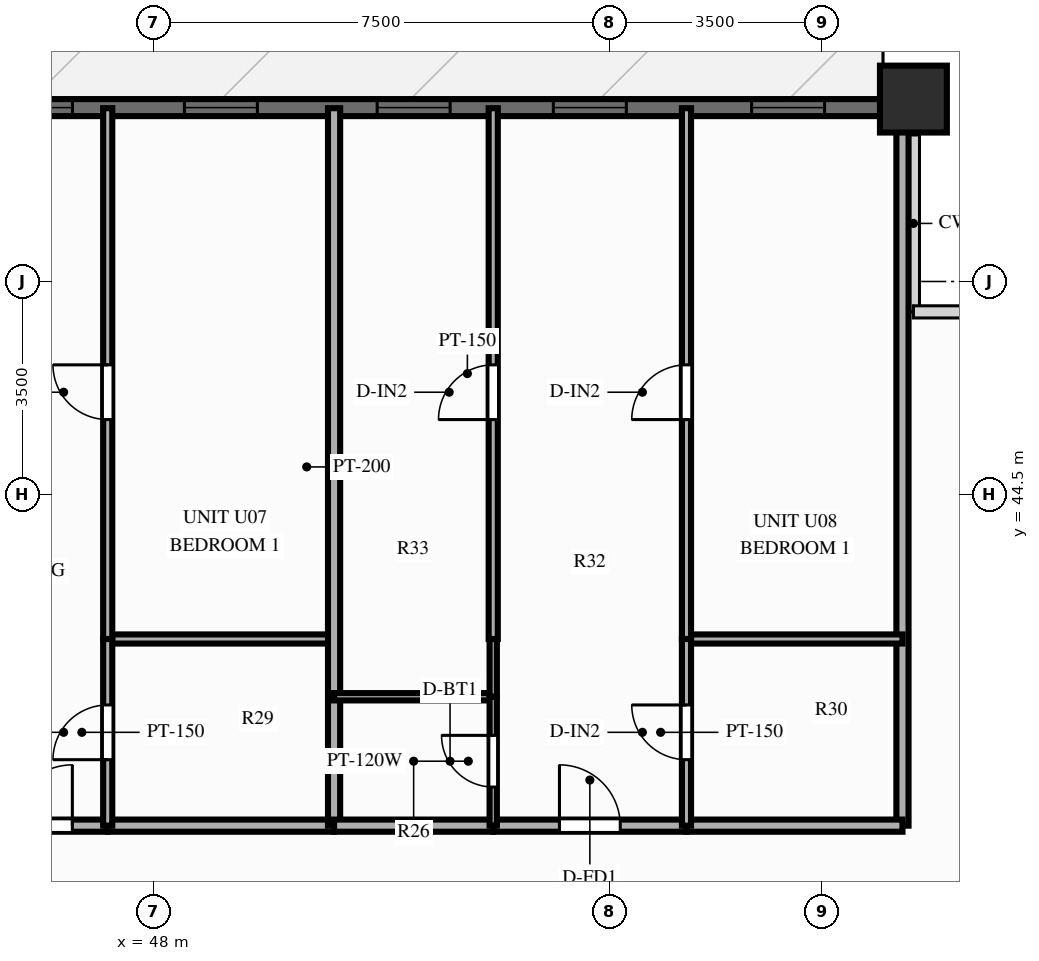
"""IFC4 building model, lengths in metres.
Left out: names, types, materials, properties, quantities, classifications, styles, units other than length and angle.
Written with IfcOpenShell. Run it as: python <this file> out.ifc"""

import sys

from ifc_helpers import new_model, si_unit, direction, frame, frame_2d, origin, origin_2d, place, context, subcontext, project, spatial, rectangle, extrude, source, transform, mapped, element, fill, save


model = new_model("IFC4")
c1 = context("Model", 3, precision=1e-05, world=origin(), true_north=direction((0.0, 1.0)))
c2 = subcontext(c1, "Body", "Model", "MODEL_VIEW")
j1 = project(units=[si_unit("LENGTHUNIT", "METRE"), si_unit("PLANEANGLEUNIT", "RADIAN")], contexts=[c1])
p1 = place(None, origin())
s1 = spatial("IfcSite", under=j1, at=p1, CompositionType="ELEMENT")
p2 = place(p1, origin())
s2 = spatial("IfcBuilding", under=s1, at=p2, CompositionType="ELEMENT")
p3 = place(p2, frame((0.0, 0.0, 43.4)))
s3 = spatial("IfcBuildingStorey", under=s2, at=p3, CompositionType="ELEMENT", Elevation=43.4)
m1 = source(origin(), c2, "Body", "SweptSolid", [
    extrude(rectangle(XDim=1.1, YDim=1.1, at=origin_2d()), origin(), (0.0, 0.0, 1.0), 3.0),
])
p4 = place(p3, frame((60.5, 51.0, 0.0), z_axis=(0.0, 0.0, 1.0), x_axis=(1.0, 0.0, 0.0)))
e1 = element("IfcColumn", 1, at=p4, inside=s3, PredefinedType="COLUMN", context=c2, shape_type="MappedRepresentation", body=[
    mapped(m1, transform((0.0, 0.0, 0.0), scale=1.0)),
])
p5 = place(p3, frame((15.5, 50.86, 0.0), z_axis=(0.0, 0.0, 1.0), x_axis=(1.0, 0.0, 0.0)))
e2 = element("IfcWall", 2, at=p5, inside=s3, PredefinedType="SOLIDWALL", context=c2, shape_type="SweptSolid", body=[
    extrude(rectangle(XDim=45.0, YDim=0.28, at=frame_2d((22.5, 0.0))), origin(), (0.0, 0.0, 1.0), 2.28),
])
p6 = place(p5, frame((0.76, 0.0, 0.25)))
e3 = element("IfcOpeningElement", 3, at=p6, cuts=e2, PredefinedType="OPENING", context=c2, shape_type="SweptSolid", body=[
    extrude(rectangle(XDim=1.2, YDim=1.5, at=frame_2d((0.6, 0.75))), frame((0.0, 0.152, 0.0), z_axis=(0.0, -1.0, 0.0), x_axis=(1.0, 0.0, 0.0)), (0.0, 0.0, 1.0), 0.304),
])
p7 = place(p5, frame((3.105, 0.0, 0.25)))
e4 = element("IfcOpeningElement", 4, at=p7, cuts=e2, PredefinedType="OPENING", context=c2, shape_type="SweptSolid", body=[
    extrude(rectangle(XDim=1.2, YDim=1.5, at=frame_2d((0.6, 0.75))), frame((0.0, 0.152, 0.0), z_axis=(0.0, -1.0, 0.0), x_axis=(1.0, 0.0, 0.0)), (0.0, 0.0, 1.0), 0.304),
])
p8 = place(p5, frame((6.98, 0.0, 0.25)))
e5 = element("IfcOpeningElement", 5, at=p8, cuts=e2, PredefinedType="OPENING", context=c2, shape_type="SweptSolid", body=[
    extrude(rectangle(XDim=1.2, YDim=1.5, at=frame_2d((0.6, 0.75))), frame((0.0, 0.152, 0.0), z_axis=(0.0, -1.0, 0.0), x_axis=(1.0, 0.0, 0.0)), (0.0, 0.0, 1.0), 0.304),
])
p9 = place(p5, frame((11.341, 0.0, 0.25)))
e6 = element("IfcOpeningElement", 6, at=p9, cuts=e2, PredefinedType="OPENING", context=c2, shape_type="SweptSolid", body=[
    extrude(rectangle(XDim=1.2, YDim=1.5, at=frame_2d((0.6, 0.75))), frame((0.0, 0.152, 0.0), z_axis=(0.0, -1.0, 0.0), x_axis=(1.0, 0.0, 0.0)), (0.0, 0.0, 1.0), 0.304),
])
p10 = place(p5, frame((14.231, 0.0, 0.25)))
e7 = element("IfcOpeningElement", 7, at=p10, cuts=e2, PredefinedType="OPENING", context=c2, shape_type="SweptSolid", body=[
    extrude(rectangle(XDim=0.95, YDim=1.5, at=frame_2d((0.475, 0.75))), frame((0.0, 0.152, 0.0), z_axis=(0.0, -1.0, 0.0), x_axis=(1.0, 0.0, 0.0)), (0.0, 0.0, 1.0), 0.304),
])
p11 = place(p5, frame((18.502, 0.0, 0.0)))
e8 = element("IfcOpeningElement", 8, at=p11, cuts=e2, PredefinedType="OPENING", context=c2, shape_type="SweptSolid", body=[
    extrude(rectangle(XDim=1.1, YDim=2.15, at=frame_2d((0.55, 1.075))), frame((0.0, 0.152, 0.0), z_axis=(0.0, -1.0, 0.0), x_axis=(1.0, 0.0, 0.0)), (0.0, 0.0, 1.0), 0.304),
])
p12 = place(p5, frame((22.813, 0.0, 0.25)))
e9 = element("IfcOpeningElement", 9, at=p12, cuts=e2, PredefinedType="OPENING", context=c2, shape_type="SweptSolid", body=[
    extrude(rectangle(XDim=1.2, YDim=1.5, at=frame_2d((0.6, 0.75))), frame((0.0, 0.152, 0.0), z_axis=(0.0, -1.0, 0.0), x_axis=(1.0, 0.0, 0.0)), (0.0, 0.0, 1.0), 0.304),
])
p13 = place(p5, frame((26.05, 0.0, 0.25)))
e10 = element("IfcOpeningElement", 10, at=p13, cuts=e2, PredefinedType="OPENING", context=c2, shape_type="SweptSolid", body=[
    extrude(rectangle(XDim=1.2, YDim=1.5, at=frame_2d((0.6, 0.75))), frame((0.0, 0.152, 0.0), z_axis=(0.0, -1.0, 0.0), x_axis=(1.0, 0.0, 0.0)), (0.0, 0.0, 1.0), 0.304),
])
p14 = place(p5, frame((29.97, 0.0, 0.25)))
e11 = element("IfcOpeningElement", 11, at=p14, cuts=e2, PredefinedType="OPENING", context=c2, shape_type="SweptSolid", body=[
    extrude(rectangle(XDim=1.2, YDim=1.5, at=frame_2d((0.6, 0.75))), frame((0.0, 0.152, 0.0), z_axis=(0.0, -1.0, 0.0), x_axis=(1.0, 0.0, 0.0)), (0.0, 0.0, 1.0), 0.304),
])
p15 = place(p5, frame((33.011, 0.0, 0.25)))
e12 = element("IfcOpeningElement", 12, at=p15, cuts=e2, PredefinedType="OPENING", context=c2, shape_type="SweptSolid", body=[
    extrude(rectangle(XDim=1.2, YDim=1.5, at=frame_2d((0.6, 0.75))), frame((0.0, 0.152, 0.0), z_axis=(0.0, -1.0, 0.0), x_axis=(1.0, 0.0, 0.0)), (0.0, 0.0, 1.0), 0.304),
])
p16 = place(p5, frame((36.181, 0.0, 0.25)))
e13 = element("IfcOpeningElement", 13, at=p16, cuts=e2, PredefinedType="OPENING", context=c2, shape_type="SweptSolid", body=[
    extrude(rectangle(XDim=1.2, YDim=1.5, at=frame_2d((0.6, 0.75))), frame((0.0, 0.152, 0.0), z_axis=(0.0, -1.0, 0.0), x_axis=(1.0, 0.0, 0.0)), (0.0, 0.0, 1.0), 0.304),
])
p17 = place(p5, frame((39.079, 0.0, 0.25)))
e14 = element("IfcOpeningElement", 14, at=p17, cuts=e2, PredefinedType="OPENING", context=c2, shape_type="SweptSolid", body=[
    extrude(rectangle(XDim=1.2, YDim=1.5, at=frame_2d((0.6, 0.75))), frame((0.0, 0.152, 0.0), z_axis=(0.0, -1.0, 0.0), x_axis=(1.0, 0.0, 0.0)), (0.0, 0.0, 1.0), 0.304),
])
p18 = place(p5, frame((42.339, 0.0, 0.25)))
e15 = element("IfcOpeningElement", 15, at=p18, cuts=e2, PredefinedType="OPENING", context=c2, shape_type="SweptSolid", body=[
    extrude(rectangle(XDim=1.2, YDim=1.5, at=frame_2d((0.6, 0.75))), frame((0.0, 0.152, 0.0), z_axis=(0.0, -1.0, 0.0), x_axis=(1.0, 0.0, 0.0)), (0.0, 0.0, 1.0), 0.304),
])
p19 = place(p3, frame((60.32, 39.05, 0.0), z_axis=(0.0, 0.0, 1.0), x_axis=(0.0, 1.0, 0.0)))
e16 = element("IfcWall", 16, at=p19, inside=s3, PredefinedType="PARTITIONING", context=c2, shape_type="SweptSolid", body=[
    extrude(rectangle(XDim=11.8, YDim=0.2, at=frame_2d((5.9, 0.0))), origin(), (0.0, 0.0, 1.0), 2.79),
])
p20 = place(p3, frame((43.525, 39.05, 0.0), z_axis=(0.0, 0.0, 1.0), x_axis=(1.0, 0.0, 0.0)))
e17 = element("IfcWall", 17, at=p20, inside=s3, PredefinedType="PARTITIONING", context=c2, shape_type="SweptSolid", body=[
    extrude(rectangle(XDim=3.725, YDim=0.2, at=frame_2d((1.862, 0.0))), origin(), (0.0, 0.0, 1.0), 2.79),
])
p21 = place(p20, frame((2.143, 0.0, 0.0)))
e18 = element("IfcOpeningElement", 18, at=p21, cuts=e17, PredefinedType="OPENING", context=c2, shape_type="SweptSolid", body=[
    extrude(rectangle(XDim=1.0, YDim=2.15, at=frame_2d((0.5, 1.075))), frame((0.0, 0.112, 0.0), z_axis=(0.0, -1.0, 0.0), x_axis=(1.0, 0.0, 0.0)), (0.0, 0.0, 1.0), 0.224),
])
p22 = place(p3, frame((47.25, 39.05, 0.0), z_axis=(0.0, 0.0, 1.0), x_axis=(1.0, 0.0, 0.0)))
e19 = element("IfcWall", 19, at=p22, inside=s3, PredefinedType="PARTITIONING", context=c2, shape_type="SweptSolid", body=[
    extrude(rectangle(XDim=3.723, YDim=0.2, at=frame_2d((1.861, 0.0))), origin(), (0.0, 0.0, 1.0), 2.79),
])
p23 = place(p3, frame((47.25, 42.12, 0.0), z_axis=(0.0, 0.0, 1.0), x_axis=(1.0, 0.0, 0.0)))
e20 = element("IfcWall", 20, at=p23, inside=s3, PredefinedType="PARTITIONING", context=c2, shape_type="SweptSolid", body=[
    extrude(rectangle(XDim=3.723, YDim=0.15, at=frame_2d((1.861, 0.0))), origin(), (0.0, 0.0, 1.0), 2.79),
])
p24 = place(p3, frame((47.25, 39.05, 0.0), z_axis=(0.0, 0.0, 1.0), x_axis=(0.0, 1.0, 0.0)))
e21 = element("IfcWall", 21, at=p24, inside=s3, PredefinedType="PARTITIONING", context=c2, shape_type="SweptSolid", body=[
    extrude(rectangle(XDim=3.07, YDim=0.15, at=frame_2d((1.535, 0.0))), origin(), (0.0, 0.0, 1.0), 2.79),
])
p25 = place(p24, frame((1.085, 0.0, 0.0)))
e22 = element("IfcOpeningElement", 22, at=p25, cuts=e21, PredefinedType="OPENING", context=c2, shape_type="SweptSolid", body=[
    extrude(rectangle(XDim=0.9, YDim=2.1, at=frame_2d((0.45, 1.05))), frame((0.0, 0.087, 0.0), z_axis=(0.0, -1.0, 0.0), x_axis=(1.0, 0.0, 0.0)), (0.0, 0.0, 1.0), 0.174),
])
p26 = place(p3, frame((47.25, 42.12, 0.0), z_axis=(0.0, 0.0, 1.0), x_axis=(0.0, 1.0, 0.0)))
e23 = element("IfcWall", 23, at=p26, inside=s3, PredefinedType="PARTITIONING", context=c2, shape_type="SweptSolid", body=[
    extrude(rectangle(XDim=8.73, YDim=0.15, at=frame_2d((4.365, 0.0))), origin(), (0.0, 0.0, 1.0), 2.79),
])
p27 = place(p26, frame((3.609, 0.0, 0.0)))
e24 = element("IfcOpeningElement", 24, at=p27, cuts=e23, PredefinedType="OPENING", context=c2, shape_type="SweptSolid", body=[
    extrude(rectangle(XDim=0.9, YDim=2.1, at=frame_2d((0.45, 1.05))), frame((0.0, 0.087, 0.0), z_axis=(0.0, -1.0, 0.0), x_axis=(1.0, 0.0, 0.0)), (0.0, 0.0, 1.0), 0.174),
])
p28 = place(p3, frame((50.972, 39.05, 0.0), z_axis=(0.0, 0.0, 1.0), x_axis=(0.0, 1.0, 0.0)))
e25 = element("IfcWall", 25, at=p28, inside=s3, PredefinedType="PARTITIONING", context=c2, shape_type="SweptSolid", body=[
    extrude(rectangle(XDim=11.8, YDim=0.2, at=frame_2d((5.9, 0.0))), origin(), (0.0, 0.0, 1.0), 2.79),
])
p29 = place(p3, frame((50.972, 39.05, 0.0), z_axis=(0.0, 0.0, 1.0), x_axis=(1.0, 0.0, 0.0)))
e26 = element("IfcWall", 26, at=p29, inside=s3, PredefinedType="PARTITIONING", context=c2, shape_type="SweptSolid", body=[
    extrude(rectangle(XDim=2.617, YDim=0.2, at=frame_2d((1.309, 0.0))), origin(), (0.0, 0.0, 1.0), 2.79),
])
p30 = place(p3, frame((53.59, 39.05, 0.0), z_axis=(0.0, 0.0, 1.0), x_axis=(1.0, 0.0, 0.0)))
e27 = element("IfcWall", 27, at=p30, inside=s3, PredefinedType="PARTITIONING", context=c2, shape_type="SweptSolid", body=[
    extrude(rectangle(XDim=3.178, YDim=0.2, at=frame_2d((1.589, 0.0))), origin(), (0.0, 0.0, 1.0), 2.79),
])
p31 = place(p30, frame((1.089, 0.0, 0.0)))
e28 = element("IfcOpeningElement", 28, at=p31, cuts=e27, PredefinedType="OPENING", context=c2, shape_type="SweptSolid", body=[
    extrude(rectangle(XDim=1.0, YDim=2.15, at=frame_2d((0.5, 1.075))), frame((0.0, 0.112, 0.0), z_axis=(0.0, -1.0, 0.0), x_axis=(1.0, 0.0, 0.0)), (0.0, 0.0, 1.0), 0.224),
])
p32 = place(p3, frame((56.768, 39.05, 0.0), z_axis=(0.0, 0.0, 1.0), x_axis=(1.0, 0.0, 0.0)))
e29 = element("IfcWall", 29, at=p32, inside=s3, PredefinedType="PARTITIONING", context=c2, shape_type="SweptSolid", body=[
    extrude(rectangle(XDim=3.552, YDim=0.2, at=frame_2d((1.776, 0.0))), origin(), (0.0, 0.0, 1.0), 2.79),
])
p33 = place(p3, frame((50.972, 41.17, 0.0), z_axis=(0.0, 0.0, 1.0), x_axis=(1.0, 0.0, 0.0)))
e30 = element("IfcWall", 30, at=p33, inside=s3, PredefinedType="PARTITIONING", context=c2, shape_type="SweptSolid", body=[
    extrude(rectangle(XDim=2.617, YDim=0.12, at=frame_2d((1.309, 0.0))), origin(), (0.0, 0.0, 1.0), 2.79),
])
p34 = place(p3, frame((56.768, 42.12, 0.0), z_axis=(0.0, 0.0, 1.0), x_axis=(1.0, 0.0, 0.0)))
e31 = element("IfcWall", 31, at=p34, inside=s3, PredefinedType="PARTITIONING", context=c2, shape_type="SweptSolid", body=[
    extrude(rectangle(XDim=3.552, YDim=0.15, at=frame_2d((1.776, 0.0))), origin(), (0.0, 0.0, 1.0), 2.79),
])
p35 = place(p3, frame((53.59, 39.05, 0.0), z_axis=(0.0, 0.0, 1.0), x_axis=(0.0, 1.0, 0.0)))
e32 = element("IfcWall", 32, at=p35, inside=s3, PredefinedType="PARTITIONING", context=c2, shape_type="SweptSolid", body=[
    extrude(rectangle(XDim=2.12, YDim=0.12, at=frame_2d((1.06, 0.0))), origin(), (0.0, 0.0, 1.0), 2.79),
])
p36 = place(p35, frame((0.635, 0.0, 0.0)))
e33 = element("IfcOpeningElement", 33, at=p36, cuts=e32, PredefinedType="OPENING", context=c2, shape_type="SweptSolid", body=[
    extrude(rectangle(XDim=0.85, YDim=2.05, at=frame_2d((0.425, 1.025))), frame((0.0, 0.072, 0.0), z_axis=(0.0, -1.0, 0.0), x_axis=(1.0, 0.0, 0.0)), (0.0, 0.0, 1.0), 0.144),
])
p37 = place(p3, frame((53.59, 41.17, 0.0), z_axis=(0.0, 0.0, 1.0), x_axis=(0.0, 1.0, 0.0)))
e34 = element("IfcWall", 34, at=p37, inside=s3, PredefinedType="PARTITIONING", context=c2, shape_type="SweptSolid", body=[
    extrude(rectangle(XDim=0.95, YDim=0.12, at=frame_2d((0.475, 0.0))), origin(), (0.0, 0.0, 1.0), 2.79),
])
p38 = place(p3, frame((53.59, 42.12, 0.0), z_axis=(0.0, 0.0, 1.0), x_axis=(0.0, 1.0, 0.0)))
e35 = element("IfcWall", 35, at=p38, inside=s3, PredefinedType="PARTITIONING", context=c2, shape_type="SweptSolid", body=[
    extrude(rectangle(XDim=8.73, YDim=0.15, at=frame_2d((4.365, 0.0))), origin(), (0.0, 0.0, 1.0), 2.79),
])
p39 = place(p38, frame((3.609, 0.0, 0.0)))
e36 = element("IfcOpeningElement", 36, at=p39, cuts=e35, PredefinedType="OPENING", context=c2, shape_type="SweptSolid", body=[
    extrude(rectangle(XDim=0.9, YDim=2.1, at=frame_2d((0.45, 1.05))), frame((0.0, 0.087, 0.0), z_axis=(0.0, -1.0, 0.0), x_axis=(1.0, 0.0, 0.0)), (0.0, 0.0, 1.0), 0.174),
])
p40 = place(p3, frame((56.768, 39.05, 0.0), z_axis=(0.0, 0.0, 1.0), x_axis=(0.0, 1.0, 0.0)))
e37 = element("IfcWall", 37, at=p40, inside=s3, PredefinedType="PARTITIONING", context=c2, shape_type="SweptSolid", body=[
    extrude(rectangle(XDim=3.07, YDim=0.15, at=frame_2d((1.535, 0.0))), origin(), (0.0, 0.0, 1.0), 2.79),
])
p41 = place(p40, frame((1.085, 0.0, 0.0)))
e38 = element("IfcOpeningElement", 38, at=p41, cuts=e37, PredefinedType="OPENING", context=c2, shape_type="SweptSolid", body=[
    extrude(rectangle(XDim=0.9, YDim=2.1, at=frame_2d((0.45, 1.05))), frame((0.0, 0.087, 0.0), z_axis=(0.0, -1.0, 0.0), x_axis=(1.0, 0.0, 0.0)), (0.0, 0.0, 1.0), 0.174),
])
p42 = place(p3, frame((56.768, 42.12, 0.0), z_axis=(0.0, 0.0, 1.0), x_axis=(0.0, 1.0, 0.0)))
e39 = element("IfcWall", 39, at=p42, inside=s3, PredefinedType="PARTITIONING", context=c2, shape_type="SweptSolid", body=[
    extrude(rectangle(XDim=8.73, YDim=0.15, at=frame_2d((4.365, 0.0))), origin(), (0.0, 0.0, 1.0), 2.79),
])
p43 = place(p42, frame((3.609, 0.0, 0.0)))
e40 = element("IfcOpeningElement", 40, at=p43, cuts=e39, PredefinedType="OPENING", context=c2, shape_type="SweptSolid", body=[
    extrude(rectangle(XDim=0.9, YDim=2.1, at=frame_2d((0.45, 1.05))), frame((0.0, 0.087, 0.0), z_axis=(0.0, -1.0, 0.0), x_axis=(1.0, 0.0, 0.0)), (0.0, 0.0, 1.0), 0.174),
])
m2 = source(origin(), c2, "Body", "SweptSolid", [
    extrude(rectangle(XDim=1.2, YDim=1.5, at=frame_2d((0.6, 0.75))), frame((0.0, 0.03, 0.0), z_axis=(0.0, -1.0, 0.0), x_axis=(1.0, 0.0, 0.0)), (0.0, 0.0, 1.0), 0.06),
])
p44 = place(p14, origin())
e41 = element("IfcWindow", 41, at=p44, inside=s3, PartitioningType="SINGLE_PANEL", PredefinedType="WINDOW", context=c2, shape_type="MappedRepresentation", body=[
    mapped(m2, transform((0.0, 0.0, 0.0), scale=1.0)),
])
fill(e11, e41)
p45 = place(p15, origin())
e42 = element("IfcWindow", 42, at=p45, inside=s3, PartitioningType="SINGLE_PANEL", PredefinedType="WINDOW", context=c2, shape_type="MappedRepresentation", body=[
    mapped(m2, transform((0.0, 0.0, 0.0), scale=1.0)),
])
fill(e12, e42)
p46 = place(p16, origin())
e43 = element("IfcWindow", 43, at=p46, inside=s3, PartitioningType="SINGLE_PANEL", PredefinedType="WINDOW", context=c2, shape_type="MappedRepresentation", body=[
    mapped(m2, transform((0.0, 0.0, 0.0), scale=1.0)),
])
fill(e13, e43)
p47 = place(p17, origin())
e44 = element("IfcWindow", 44, at=p47, inside=s3, PartitioningType="SINGLE_PANEL", PredefinedType="WINDOW", context=c2, shape_type="MappedRepresentation", body=[
    mapped(m2, transform((0.0, 0.0, 0.0), scale=1.0)),
])
fill(e14, e44)
p48 = place(p18, origin())
e45 = element("IfcWindow", 45, at=p48, inside=s3, PartitioningType="SINGLE_PANEL", PredefinedType="WINDOW", context=c2, shape_type="MappedRepresentation", body=[
    mapped(m2, transform((0.0, 0.0, 0.0), scale=1.0)),
])
fill(e15, e45)
m3 = source(origin(), c2, "Body", "SweptSolid", [
    extrude(rectangle(XDim=1.0, YDim=2.15, at=frame_2d((0.5, 1.075))), frame((0.0, 0.025, 0.0), z_axis=(0.0, -1.0, 0.0), x_axis=(1.0, 0.0, 0.0)), (0.0, 0.0, 1.0), 0.05),
])
p49 = place(p21, origin())
e46 = element("IfcDoor", 46, at=p49, inside=s3, OperationType="SINGLE_SWING_RIGHT", PredefinedType="DOOR", context=c2, shape_type="MappedRepresentation", body=[
    mapped(m3, transform((0.0, 0.0, 0.0), scale=1.0)),
])
fill(e18, e46)
m4 = source(origin(), c2, "Body", "SweptSolid", [
    extrude(rectangle(XDim=0.9, YDim=2.1, at=frame_2d((0.45, 1.05))), frame((0.0, 0.025, 0.0), z_axis=(0.0, -1.0, 0.0), x_axis=(1.0, 0.0, 0.0)), (0.0, 0.0, 1.0), 0.05),
])
p50 = place(p25, origin())
e47 = element("IfcDoor", 47, at=p50, inside=s3, OperationType="SINGLE_SWING_LEFT", PredefinedType="DOOR", context=c2, shape_type="MappedRepresentation", body=[
    mapped(m4, transform((0.0, 0.0, 0.0), scale=1.0)),
])
fill(e22, e47)
p51 = place(p27, origin())
e48 = element("IfcDoor", 48, at=p51, inside=s3, OperationType="SINGLE_SWING_RIGHT", PredefinedType="DOOR", context=c2, shape_type="MappedRepresentation", body=[
    mapped(m4, transform((0.0, 0.0, 0.0), scale=1.0)),
])
fill(e24, e48)
p52 = place(p31, origin())
e49 = element("IfcDoor", 49, at=p52, inside=s3, OperationType="SINGLE_SWING_LEFT", PredefinedType="DOOR", context=c2, shape_type="MappedRepresentation", body=[
    mapped(m3, transform((0.0, 0.0, 0.0), scale=1.0)),
])
fill(e28, e49)
m5 = source(origin(), c2, "Body", "SweptSolid", [
    extrude(rectangle(XDim=0.85, YDim=2.05, at=frame_2d((0.425, 1.025))), frame((0.0, 0.025, 0.0), z_axis=(0.0, -1.0, 0.0), x_axis=(1.0, 0.0, 0.0)), (0.0, 0.0, 1.0), 0.05),
])
p53 = place(p36, origin())
e50 = element("IfcDoor", 50, at=p53, inside=s3, OperationType="SINGLE_SWING_RIGHT", PredefinedType="DOOR", context=c2, shape_type="MappedRepresentation", body=[
    mapped(m5, transform((0.0, 0.0, 0.0), scale=1.0)),
])
fill(e33, e50)
p54 = place(p39, origin())
e51 = element("IfcDoor", 51, at=p54, inside=s3, OperationType="SINGLE_SWING_LEFT", PredefinedType="DOOR", context=c2, shape_type="MappedRepresentation", body=[
    mapped(m4, transform((0.0, 0.0, 0.0), scale=1.0)),
])
fill(e36, e51)
p55 = place(p41, origin())
e52 = element("IfcDoor", 52, at=p55, inside=s3, OperationType="SINGLE_SWING_RIGHT", PredefinedType="DOOR", context=c2, shape_type="MappedRepresentation", body=[
    mapped(m4, transform((0.0, 0.0, 0.0), scale=1.0)),
])
fill(e38, e52)
p56 = place(p43, origin())
e53 = element("IfcDoor", 53, at=p56, inside=s3, OperationType="SINGLE_SWING_LEFT", PredefinedType="DOOR", context=c2, shape_type="MappedRepresentation", body=[
    mapped(m4, transform((0.0, 0.0, 0.0), scale=1.0)),
])
fill(e40, e53)
save(model, sys.argv[1])
